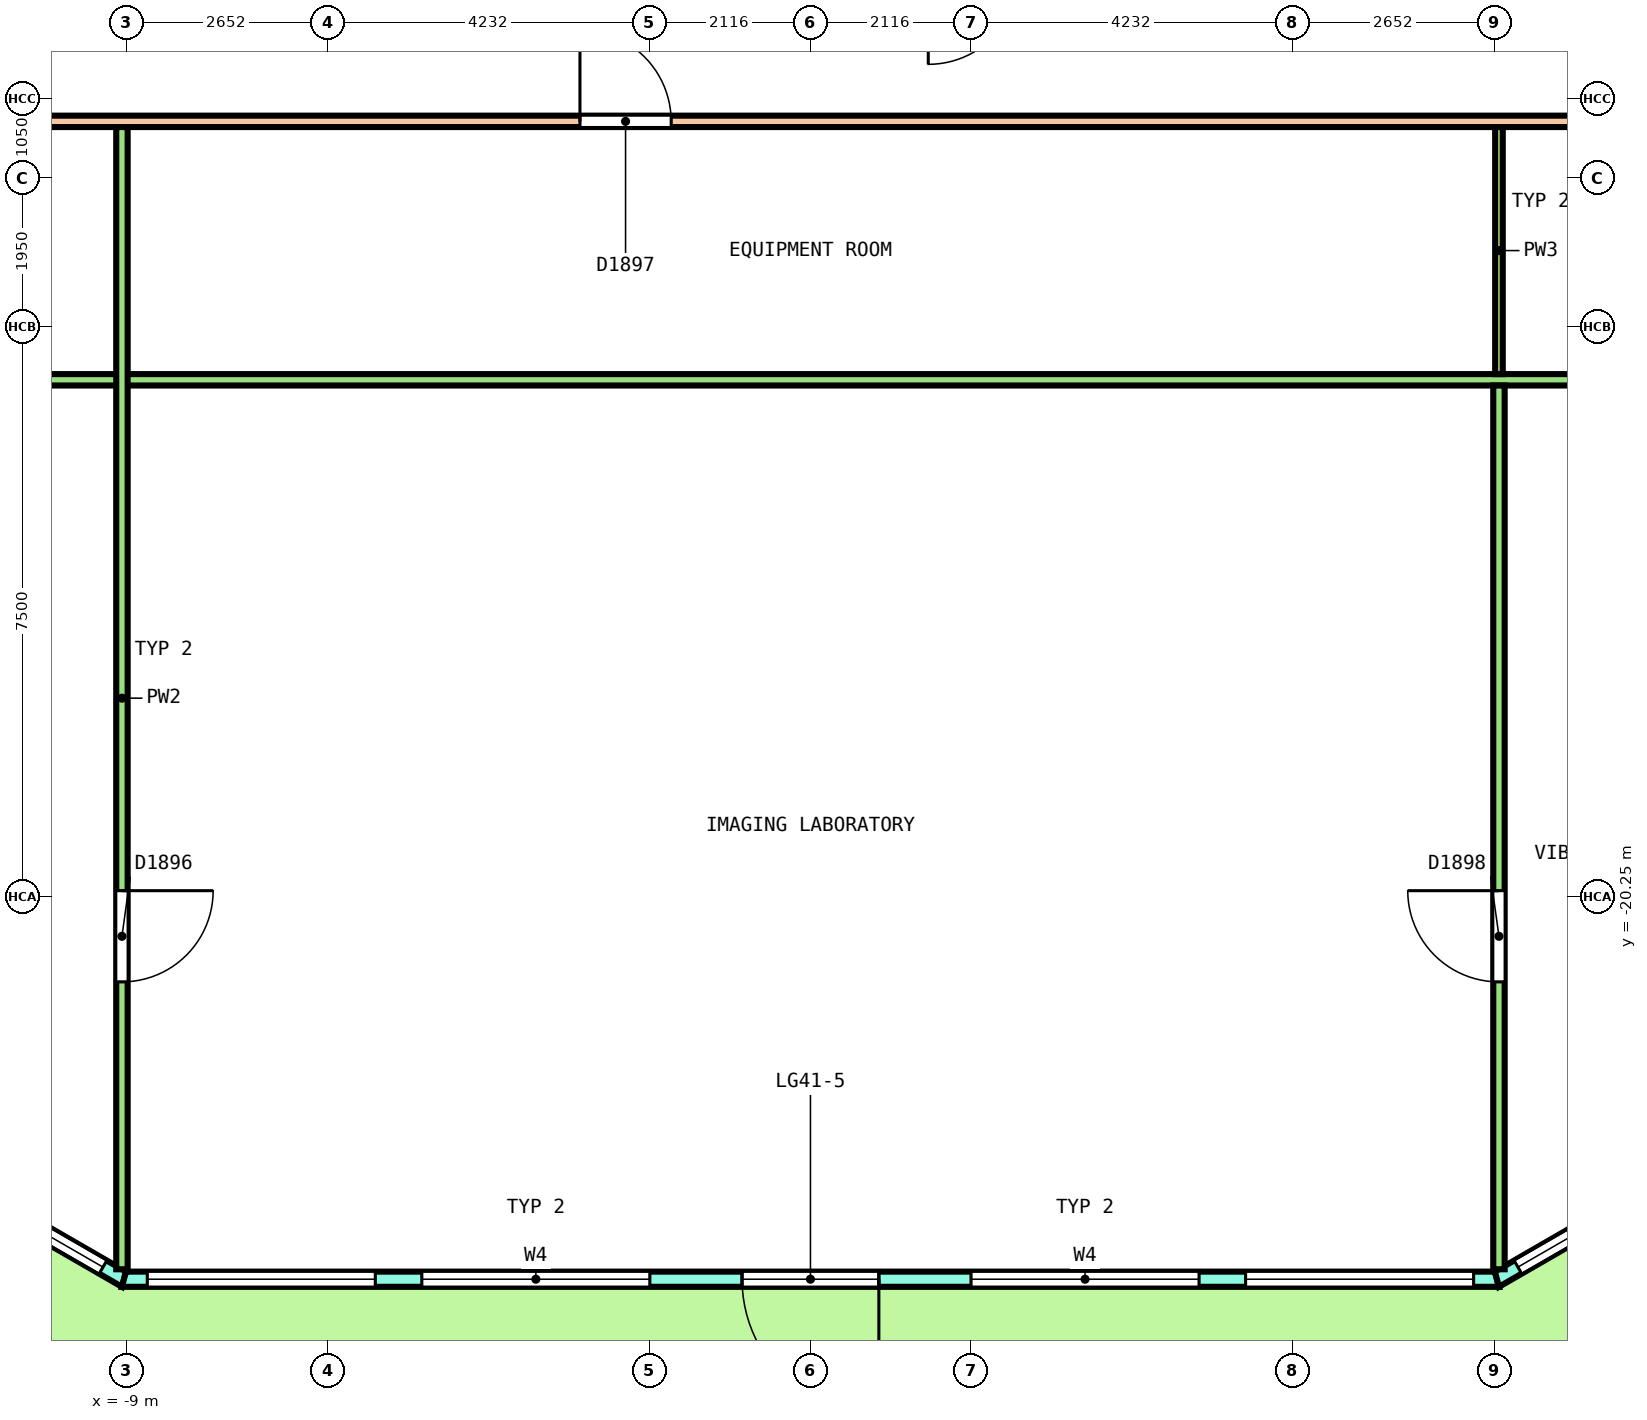
"""IFC4 building model, lengths in metres.
Left out: names, types, materials, properties, quantities, classifications, styles, units other than length and angle.
Written with IfcOpenShell. Run it as: python <this file> out.ifc"""

import sys

from ifc_helpers import new_model, si_unit, direction, frame, frame_2d, origin, place, context, subcontext, project, spatial, polyline, rectangle, outline, extrude, element, fill, save


model = new_model("IFC4")
c1 = context("Model", 3, precision=1e-05, world=origin(), true_north=direction((0.0, 1.0)))
c2 = subcontext(c1, "Body", "Model", "MODEL_VIEW")
j1 = project(units=[si_unit("LENGTHUNIT", "METRE"), si_unit("PLANEANGLEUNIT", "RADIAN")], contexts=[c1])
p1 = place(None, origin())
s1 = spatial("IfcSite", under=j1, at=p1, CompositionType="ELEMENT")
p2 = place(p1, origin())
s2 = spatial("IfcBuilding", under=s1, at=p2, CompositionType="ELEMENT")
p3 = place(p2, frame((0.0, 0.0, 189.2)))
s3 = spatial("IfcBuildingStorey", under=s2, at=p3, CompositionType="ELEMENT", Elevation=189.2)
p4 = place(p3, frame((-14.985, -21.845, 0.0), z_axis=(0.0, 0.0, 1.0), x_axis=(0.866029458321, -0.49999297727, 0.0)))
e1 = element("IfcWall", 1, at=p4, inside=s3, PredefinedType="SOLIDWALL", context=c2, shape_type="SweptSolid", body=[
    extrude(outline(polyline([(-0.027, -0.1), (1.128, -0.1), (2.282, -0.1), (3.437, -0.1), (4.592, -0.1), (5.747, -0.1), (6.901, -0.1), (6.848, 0.1), (5.711, 0.1), (4.574, 0.1), (3.437, 0.1), (2.301, 0.1), (1.164, 0.1), (0.027, 0.1), (-0.027, -0.1)])), origin(), (0.0, 0.0, 1.0), 4.1),
])
p5 = place(p4, frame((0.319, 0.0, 0.1)))
e2 = element("IfcOpeningElement", 2, at=p5, cuts=e1, PredefinedType="OPENING", context=c2, shape_type="SweptSolid", body=[
    extrude(rectangle(XDim=2.8, YDim=2.9, at=frame_2d((1.4, 1.45))), frame((0.0, 0.11, 0.0), z_axis=(0.0, -1.0, 0.0), x_axis=(1.0, 0.0, 0.0)), (0.0, 0.0, 1.0), 0.22),
])
p6 = place(p4, frame((3.756, 0.0, 0.1)))
e3 = element("IfcOpeningElement", 3, at=p6, cuts=e1, PredefinedType="OPENING", context=c2, shape_type="SweptSolid", body=[
    extrude(rectangle(XDim=2.8, YDim=2.9, at=frame_2d((1.4, 1.45))), frame((0.0, 0.11, 0.0), z_axis=(0.0, -1.0, 0.0), x_axis=(1.0, 0.0, 0.0)), (0.0, 0.0, 1.0), 0.22),
])
p7 = place(p3, frame((-9.031, -25.283, 0.0), z_axis=(0.0, 0.0, 1.0), x_axis=(1.0, 0.0, 0.0)))
e4 = element("IfcWall", 4, at=p7, inside=s3, PredefinedType="SOLIDWALL", context=c2, shape_type="SweptSolid", body=[
    extrude(outline(polyline([(-0.027, -0.1), (0.979, -0.1), (1.986, -0.1), (2.992, -0.1), (3.999, -0.1), (5.005, -0.1), (6.012, -0.1), (7.018, -0.1), (8.025, -0.1), (9.031, -0.1), (10.038, -0.1), (11.044, -0.1), (12.051, -0.1), (13.057, -0.1), (14.063, -0.1), (15.07, -0.1), (16.076, -0.1), (17.083, -0.1), (18.089, -0.1), (18.036, 0.1), (17.035, 0.1), (16.035, 0.1), (15.034, 0.1), (14.034, 0.1), (13.033, 0.1), (12.033, 0.1), (11.032, 0.1), (10.032, 0.1), (9.031, 0.1), (8.031, 0.1), (7.03, 0.1), (6.03, 0.1), (5.029, 0.1), (4.029, 0.1), (3.028, 0.1), (2.028, 0.1), (1.027, 0.1), (0.027, 0.1), (-0.027, -0.1)])), origin(), (0.0, 0.0, 1.0), 4.1),
])
p8 = place(p7, frame((0.306, 0.0, 0.1)))
e5 = element("IfcOpeningElement", 5, at=p8, cuts=e4, PredefinedType="OPENING", context=c2, shape_type="SweptSolid", body=[
    extrude(rectangle(XDim=3.0, YDim=2.9, at=frame_2d((1.5, 1.45))), frame((0.0, 0.11, 0.0), z_axis=(0.0, -1.0, 0.0), x_axis=(1.0, 0.0, 0.0)), (0.0, 0.0, 1.0), 0.22),
])
p9 = place(p7, frame((3.919, 0.0, 0.1)))
e6 = element("IfcOpeningElement", 6, at=p9, cuts=e4, PredefinedType="OPENING", context=c2, shape_type="SweptSolid", body=[
    extrude(rectangle(XDim=3.0, YDim=2.9, at=frame_2d((1.5, 1.45))), frame((0.0, 0.11, 0.0), z_axis=(0.0, -1.0, 0.0), x_axis=(1.0, 0.0, 0.0)), (0.0, 0.0, 1.0), 0.22),
])
p10 = place(p7, frame((8.131, 0.0, 0.0)))
e7 = element("IfcOpeningElement", 7, at=p10, cuts=e4, PredefinedType="OPENING", context=c2, shape_type="SweptSolid", body=[
    extrude(rectangle(XDim=1.8, YDim=2.4, at=frame_2d((0.9, 1.2))), frame((0.0, 0.11, 0.0), z_axis=(0.0, -1.0, 0.0), x_axis=(1.0, 0.0, 0.0)), (0.0, 0.0, 1.0), 0.22),
])
p11 = place(p7, frame((8.131, 0.0, 2.55)))
e8 = element("IfcOpeningElement", 8, at=p11, cuts=e4, PredefinedType="OPENING", context=c2, shape_type="SweptSolid", body=[
    extrude(rectangle(XDim=1.8, YDim=0.45, at=frame_2d((0.9, 0.225))), frame((0.0, 0.11, 0.0), z_axis=(0.0, -1.0, 0.0), x_axis=(1.0, 0.0, 0.0)), (0.0, 0.0, 1.0), 0.22),
])
p12 = place(p7, frame((11.144, 0.0, 0.1)))
e9 = element("IfcOpeningElement", 9, at=p12, cuts=e4, PredefinedType="OPENING", context=c2, shape_type="SweptSolid", body=[
    extrude(rectangle(XDim=3.0, YDim=2.9, at=frame_2d((1.5, 1.45))), frame((0.0, 0.11, 0.0), z_axis=(0.0, -1.0, 0.0), x_axis=(1.0, 0.0, 0.0)), (0.0, 0.0, 1.0), 0.22),
])
p13 = place(p7, frame((14.756, 0.0, 0.1)))
e10 = element("IfcOpeningElement", 10, at=p13, cuts=e4, PredefinedType="OPENING", context=c2, shape_type="SweptSolid", body=[
    extrude(rectangle(XDim=3.0, YDim=2.9, at=frame_2d((1.5, 1.45))), frame((0.0, 0.11, 0.0), z_axis=(0.0, -1.0, 0.0), x_axis=(1.0, 0.0, 0.0)), (0.0, 0.0, 1.0), 0.22),
])
p14 = place(p3, frame((9.031, -25.283, 0.0), z_axis=(0.0, 0.0, 1.0), x_axis=(0.866029458321, 0.49999297727, 0.0)))
e11 = element("IfcWall", 11, at=p14, inside=s3, PredefinedType="SOLIDWALL", context=c2, shape_type="SweptSolid", body=[
    extrude(outline(polyline([(-0.027, -0.1), (1.128, -0.1), (2.282, -0.1), (3.437, -0.1), (4.592, -0.1), (5.747, -0.1), (6.901, -0.1), (6.848, 0.1), (5.711, 0.1), (4.574, 0.1), (3.437, 0.1), (2.301, 0.1), (1.164, 0.1), (0.027, 0.1), (-0.027, -0.1)])), origin(), (0.0, 0.0, 1.0), 4.1),
])
p15 = place(p14, frame((0.319, 0.0, 0.1)))
e12 = element("IfcOpeningElement", 12, at=p15, cuts=e11, PredefinedType="OPENING", context=c2, shape_type="SweptSolid", body=[
    extrude(rectangle(XDim=2.8, YDim=2.9, at=frame_2d((1.4, 1.45))), frame((0.0, 0.11, 0.0), z_axis=(0.0, -1.0, 0.0), x_axis=(1.0, 0.0, 0.0)), (0.0, 0.0, 1.0), 0.22),
])
p16 = place(p14, frame((3.756, 0.0, 0.1)))
e13 = element("IfcOpeningElement", 13, at=p16, cuts=e11, PredefinedType="OPENING", context=c2, shape_type="SweptSolid", body=[
    extrude(rectangle(XDim=2.8, YDim=2.9, at=frame_2d((1.4, 1.45))), frame((0.0, 0.11, 0.0), z_axis=(0.0, -1.0, 0.0), x_axis=(1.0, 0.0, 0.0)), (0.0, 0.0, 1.0), 0.22),
])
p17 = place(p3, frame((-15.225, -10.05, 0.0), z_axis=(0.0, 0.0, 1.0), x_axis=(1.0, 0.0, 0.0)))
e14 = element("IfcWall", 14, at=p17, inside=s3, PredefinedType="PARTITIONING", context=c2, shape_type="SweptSolid", body=[
    extrude(rectangle(XDim=30.325, YDim=0.15, at=frame_2d((15.163, 0.0))), origin(), (0.0, 0.0, 1.0), 3.05),
])
p18 = place(p17, frame((3.742, 0.0, 0.0)))
e15 = element("IfcOpeningElement", 15, at=p18, cuts=e14, PredefinedType="OPENING", context=c2, shape_type="SweptSolid", body=[
    extrude(rectangle(XDim=1.0, YDim=2.1, at=frame_2d((0.5, 1.05))), frame((0.0, 0.085, 0.0), z_axis=(0.0, -1.0, 0.0), x_axis=(1.0, 0.0, 0.0)), (0.0, 0.0, 1.0), 0.17),
])
p19 = place(p17, frame((12.193, 0.0, 0.0)))
e16 = element("IfcOpeningElement", 16, at=p19, cuts=e14, PredefinedType="OPENING", context=c2, shape_type="SweptSolid", body=[
    extrude(rectangle(XDim=1.2, YDim=2.1, at=frame_2d((0.6, 1.05))), frame((0.0, 0.085, 0.0), z_axis=(0.0, -1.0, 0.0), x_axis=(1.0, 0.0, 0.0)), (0.0, 0.0, 1.0), 0.17),
])
p20 = place(p17, frame((26.829, 0.0, 0.0)))
e17 = element("IfcOpeningElement", 17, at=p20, cuts=e14, PredefinedType="OPENING", context=c2, shape_type="SweptSolid", body=[
    extrude(rectangle(XDim=1.0, YDim=2.1, at=frame_2d((0.5, 1.05))), frame((0.0, 0.085, 0.0), z_axis=(0.0, -1.0, 0.0), x_axis=(1.0, 0.0, 0.0)), (0.0, 0.0, 1.0), 0.17),
])
p21 = place(p3, frame((-14.983, -13.45, 0.0), z_axis=(0.0, 0.0, 1.0), x_axis=(1.0, 0.0, 0.0)))
e18 = element("IfcWall", 18, at=p21, inside=s3, PredefinedType="PARTITIONING", context=c2, shape_type="SweptSolid", body=[
    extrude(rectangle(XDim=31.004, YDim=0.15, at=frame_2d((15.502, 0.0))), origin(), (0.0, 0.0, 1.0), 3.05),
])
p22 = place(p21, frame((1.3, 0.0, 0.0)))
e19 = element("IfcOpeningElement", 19, at=p22, cuts=e18, PredefinedType="OPENING", context=c2, shape_type="SweptSolid", body=[
    extrude(rectangle(XDim=1.2, YDim=2.1, at=frame_2d((0.6, 1.05))), frame((0.0, 0.085, 0.0), z_axis=(0.0, -1.0, 0.0), x_axis=(1.0, 0.0, 0.0)), (0.0, 0.0, 1.0), 0.17),
])
p23 = place(p3, frame((-9.058, -25.152, 0.0), z_axis=(0.0, 0.0, 1.0), x_axis=(0.0, 1.0, 0.0)))
e20 = element("IfcWall", 20, at=p23, inside=s3, PredefinedType="PARTITIONING", context=c2, shape_type="SweptSolid", body=[
    extrude(rectangle(XDim=15.027, YDim=0.15, at=frame_2d((7.513, 0.0))), origin(), (0.0, 0.0, 1.0), 3.05),
])
p24 = place(p23, frame((3.781, 0.0, 0.0)))
e21 = element("IfcOpeningElement", 21, at=p24, cuts=e20, PredefinedType="OPENING", context=c2, shape_type="SweptSolid", body=[
    extrude(rectangle(XDim=1.2, YDim=2.1, at=frame_2d((0.6, 1.05))), frame((0.0, 0.085, 0.0), z_axis=(0.0, -1.0, 0.0), x_axis=(1.0, 0.0, 0.0)), (0.0, 0.0, 1.0), 0.17),
])
p25 = place(p3, frame((9.058, -25.152, 0.0), z_axis=(0.0, 0.0, 1.0), x_axis=(0.0, 1.0, 0.0)))
e22 = element("IfcWall", 22, at=p25, inside=s3, PredefinedType="PARTITIONING", context=c2, shape_type="SweptSolid", body=[
    extrude(rectangle(XDim=11.627, YDim=0.15, at=frame_2d((5.813, 0.0))), origin(), (0.0, 0.0, 1.0), 3.05),
])
p26 = place(p25, frame((3.781, 0.0, 0.0)))
e23 = element("IfcOpeningElement", 23, at=p26, cuts=e22, PredefinedType="OPENING", context=c2, shape_type="SweptSolid", body=[
    extrude(rectangle(XDim=1.2, YDim=2.1, at=frame_2d((0.6, 1.05))), frame((0.0, 0.085, 0.0), z_axis=(0.0, -1.0, 0.0), x_axis=(1.0, 0.0, 0.0)), (0.0, 0.0, 1.0), 0.17),
])
p27 = place(p3, frame((9.058, -13.375, 0.0), z_axis=(0.0, 0.0, 1.0), x_axis=(0.0, 1.0, 0.0)))
e24 = element("IfcWall", 24, at=p27, inside=s3, PredefinedType="PARTITIONING", context=c2, shape_type="SweptSolid", body=[
    extrude(rectangle(XDim=3.25, YDim=0.1, at=frame_2d((1.625, 0.0))), origin(), (0.0, 0.0, 1.0), 3.05),
])
p28 = place(p6, origin())
e25 = element("IfcWindow", 25, at=p28, inside=s3, PartitioningType="SINGLE_PANEL", PredefinedType="WINDOW", context=c2, shape_type="SweptSolid", body=[
    extrude(rectangle(XDim=2.8, YDim=2.9, at=frame_2d((1.4, 1.45))), frame((0.0, 0.03, 0.0), z_axis=(0.0, -1.0, 0.0), x_axis=(1.0, 0.0, 0.0)), (0.0, 0.0, 1.0), 0.06),
])
fill(e3, e25)
p29 = place(p8, origin())
e26 = element("IfcWindow", 26, at=p29, inside=s3, PartitioningType="SINGLE_PANEL", PredefinedType="WINDOW", context=c2, shape_type="SweptSolid", body=[
    extrude(rectangle(XDim=3.0, YDim=2.9, at=frame_2d((1.5, 1.45))), frame((0.0, 0.03, 0.0), z_axis=(0.0, -1.0, 0.0), x_axis=(1.0, 0.0, 0.0)), (0.0, 0.0, 1.0), 0.06),
])
fill(e5, e26)
p30 = place(p9, origin())
e27 = element("IfcWindow", 27, at=p30, inside=s3, PartitioningType="SINGLE_PANEL", PredefinedType="WINDOW", context=c2, shape_type="SweptSolid", body=[
    extrude(rectangle(XDim=3.0, YDim=2.9, at=frame_2d((1.5, 1.45))), frame((0.0, 0.03, 0.0), z_axis=(0.0, -1.0, 0.0), x_axis=(1.0, 0.0, 0.0)), (0.0, 0.0, 1.0), 0.06),
])
fill(e6, e27)
p31 = place(p10, origin())
e28 = element("IfcDoor", 28, at=p31, inside=s3, OperationType="DOUBLE_DOOR_SINGLE_SWING", PredefinedType="DOOR", context=c2, shape_type="SweptSolid", body=[
    extrude(rectangle(XDim=1.8, YDim=2.4, at=frame_2d((0.9, 1.2))), frame((0.0, 0.025, 0.0), z_axis=(0.0, -1.0, 0.0), x_axis=(1.0, 0.0, 0.0)), (0.0, 0.0, 1.0), 0.05),
])
fill(e7, e28)
p32 = place(p11, origin())
e29 = element("IfcWindow", 29, at=p32, inside=s3, PartitioningType="SINGLE_PANEL", PredefinedType="WINDOW", context=c2, shape_type="SweptSolid", body=[
    extrude(rectangle(XDim=1.8, YDim=0.45, at=frame_2d((0.9, 0.225))), frame((0.0, 0.03, 0.0), z_axis=(0.0, -1.0, 0.0), x_axis=(1.0, 0.0, 0.0)), (0.0, 0.0, 1.0), 0.06),
])
fill(e8, e29)
p33 = place(p12, origin())
e30 = element("IfcWindow", 30, at=p33, inside=s3, PartitioningType="SINGLE_PANEL", PredefinedType="WINDOW", context=c2, shape_type="SweptSolid", body=[
    extrude(rectangle(XDim=3.0, YDim=2.9, at=frame_2d((1.5, 1.45))), frame((0.0, 0.03, 0.0), z_axis=(0.0, -1.0, 0.0), x_axis=(1.0, 0.0, 0.0)), (0.0, 0.0, 1.0), 0.06),
])
fill(e9, e30)
p34 = place(p13, origin())
e31 = element("IfcWindow", 31, at=p34, inside=s3, PartitioningType="SINGLE_PANEL", PredefinedType="WINDOW", context=c2, shape_type="SweptSolid", body=[
    extrude(rectangle(XDim=3.0, YDim=2.9, at=frame_2d((1.5, 1.45))), frame((0.0, 0.03, 0.0), z_axis=(0.0, -1.0, 0.0), x_axis=(1.0, 0.0, 0.0)), (0.0, 0.0, 1.0), 0.06),
])
fill(e10, e31)
p35 = place(p15, origin())
e32 = element("IfcWindow", 32, at=p35, inside=s3, PartitioningType="SINGLE_PANEL", PredefinedType="WINDOW", context=c2, shape_type="SweptSolid", body=[
    extrude(rectangle(XDim=2.8, YDim=2.9, at=frame_2d((1.4, 1.45))), frame((0.0, 0.03, 0.0), z_axis=(0.0, -1.0, 0.0), x_axis=(1.0, 0.0, 0.0)), (0.0, 0.0, 1.0), 0.06),
])
fill(e12, e32)
p36 = place(p24, origin())
e33 = element("IfcDoor", 33, at=p36, inside=s3, OperationType="DOUBLE_DOOR_SINGLE_SWING", PredefinedType="DOOR", context=c2, shape_type="SweptSolid", body=[
    extrude(rectangle(XDim=1.2, YDim=2.1, at=frame_2d((0.6, 1.05))), frame((0.0, 0.025, 0.0), z_axis=(0.0, -1.0, 0.0), x_axis=(1.0, 0.0, 0.0)), (0.0, 0.0, 1.0), 0.05),
])
fill(e21, e33)
p37 = place(p19, origin())
e34 = element("IfcDoor", 34, at=p37, inside=s3, OperationType="DOUBLE_DOOR_SINGLE_SWING", PredefinedType="DOOR", context=c2, shape_type="SweptSolid", body=[
    extrude(rectangle(XDim=1.2, YDim=2.1, at=frame_2d((0.6, 1.05))), frame((0.0, 0.025, 0.0), z_axis=(0.0, -1.0, 0.0), x_axis=(1.0, 0.0, 0.0)), (0.0, 0.0, 1.0), 0.05),
])
fill(e16, e34)
p38 = place(p26, origin())
e35 = element("IfcDoor", 35, at=p38, inside=s3, OperationType="DOUBLE_DOOR_SINGLE_SWING", PredefinedType="DOOR", context=c2, shape_type="SweptSolid", body=[
    extrude(rectangle(XDim=1.2, YDim=2.1, at=frame_2d((0.6, 1.05))), frame((0.0, 0.025, 0.0), z_axis=(0.0, -1.0, 0.0), x_axis=(1.0, 0.0, 0.0)), (0.0, 0.0, 1.0), 0.05),
])
fill(e23, e35)
save(model, sys.argv[1])
